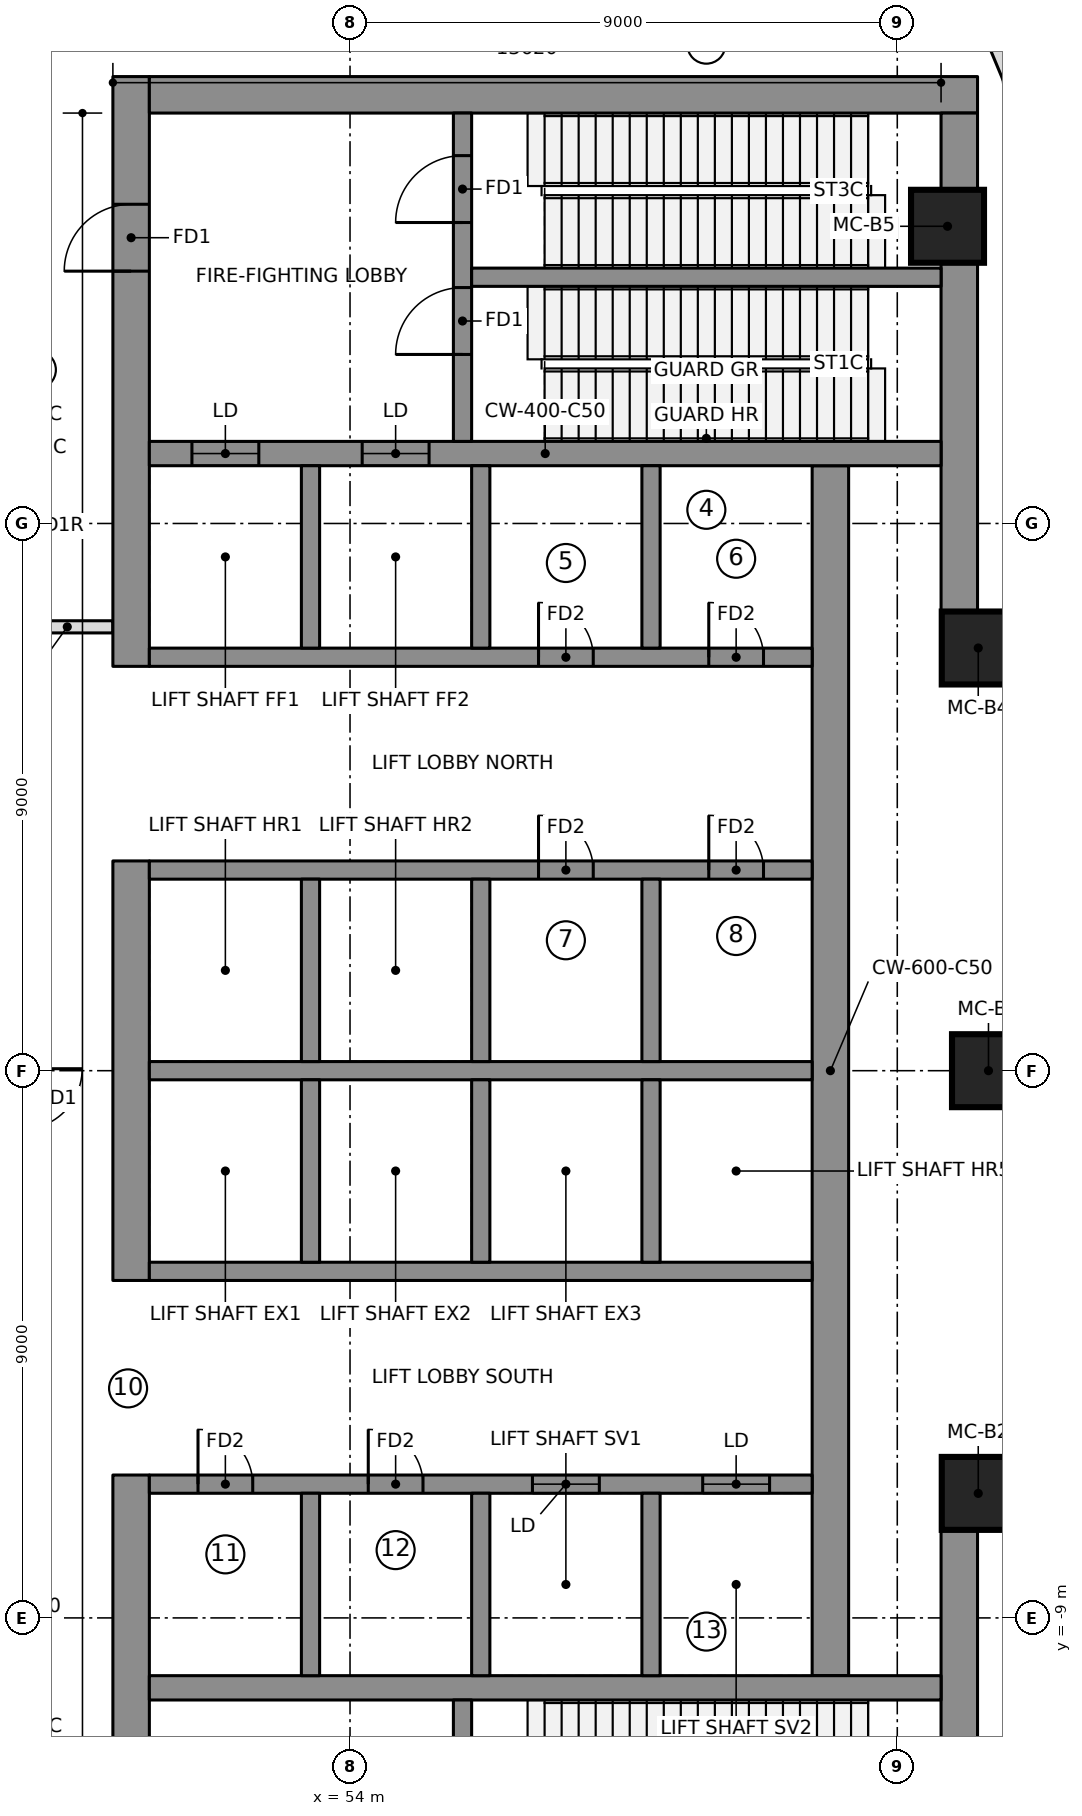
"""IFC4 building model, lengths in metres.
Left out: names, types, materials, properties, quantities, classifications, styles, units other than length and angle.
Written with IfcOpenShell. Run it as: python <this file> out.ifc"""

import sys

from ifc_helpers import new_model, si_unit, direction, frame, frame_2d, origin, origin_2d, place, context, subcontext, project, spatial, polyline, rectangle, outline, extrude, element, fill, save


model = new_model("IFC4")
c1 = context("Model", 3, precision=1e-05, world=origin(), true_north=direction((0.0, 1.0)))
c2 = subcontext(c1, "Body", "Model", "MODEL_VIEW")
j1 = project(units=[si_unit("LENGTHUNIT", "METRE"), si_unit("PLANEANGLEUNIT", "RADIAN")], contexts=[c1])
p1 = place(None, origin())
s1 = spatial("IfcSite", under=j1, at=p1, CompositionType="ELEMENT")
p2 = place(p1, origin())
s2 = spatial("IfcBuilding", under=s1, at=p2, CompositionType="ELEMENT")
p3 = place(p2, frame((0.0, 0.0, 256.3)))
s3 = spatial("IfcBuildingStorey", under=s2, at=p3, CompositionType="ELEMENT", Elevation=256.3)
p4 = place(p3, frame((50.4, 6.65, 0.0), z_axis=(0.0, 0.0, 1.0), x_axis=(0.0, 1.0, 0.0)))
e1 = element("IfcWall", 1, at=p4, inside=s3, PredefinedType="SHEAR", context=c2, shape_type="SweptSolid", body=[
    extrude(rectangle(XDim=9.7, YDim=0.6, at=frame_2d((4.85, 0.0))), origin(), (0.0, 0.0, 1.0), 7.0),
])
p5 = place(p4, frame((6.5, 0.0, 0.0)))
e2 = element("IfcOpeningElement", 2, at=p5, cuts=e1, PredefinedType="OPENING", context=c2, shape_type="SweptSolid", body=[
    extrude(rectangle(XDim=1.1, YDim=2.1, at=frame_2d((0.55, 1.05))), frame((0.0, 0.31, 0.0), z_axis=(0.0, -1.0, 0.0), x_axis=(1.0, 0.0, 0.0)), (0.0, 0.0, 1.0), 0.62),
])
p6 = place(p3, frame((50.4, -3.45, 0.0), z_axis=(0.0, 0.0, 1.0), x_axis=(0.0, 1.0, 0.0)))
e3 = element("IfcWall", 3, at=p6, inside=s3, PredefinedType="SHEAR", context=c2, shape_type="SweptSolid", body=[
    extrude(rectangle(XDim=6.9, YDim=0.6, at=frame_2d((3.45, 0.0))), origin(), (0.0, 0.0, 1.0), 7.0),
])
p7 = place(p3, frame((50.4, -16.35, 0.0), z_axis=(0.0, 0.0, 1.0), x_axis=(0.0, 1.0, 0.0)))
e4 = element("IfcWall", 4, at=p7, inside=s3, PredefinedType="SHEAR", context=c2, shape_type="SweptSolid", body=[
    extrude(rectangle(XDim=9.7, YDim=0.6, at=frame_2d((4.85, 0.0))), origin(), (0.0, 0.0, 1.0), 7.0),
])
p8 = place(p7, frame((2.1, 0.0, 0.0)))
e5 = element("IfcOpeningElement", 5, at=p8, cuts=e4, PredefinedType="OPENING", context=c2, shape_type="SweptSolid", body=[
    extrude(rectangle(XDim=1.1, YDim=2.1, at=frame_2d((0.55, 1.05))), frame((0.0, 0.31, 0.0), z_axis=(0.0, -1.0, 0.0), x_axis=(1.0, 0.0, 0.0)), (0.0, 0.0, 1.0), 0.62),
])
p9 = place(p3, frame((50.7, 16.05, 0.0), z_axis=(0.0, 0.0, 1.0), x_axis=(1.0, 0.0, 0.0)))
e6 = element("IfcWall", 6, at=p9, inside=s3, PredefinedType="SHEAR", context=c2, shape_type="SweptSolid", body=[
    extrude(rectangle(XDim=13.62, YDim=0.6, at=frame_2d((6.81, 0.0))), origin(), (0.0, 0.0, 1.0), 7.0),
])
for number, where, z_axis, x_axis in (
    (7, (64.02, 7.502, 0.0), (0.0, 0.0, 1.0), (0.0, 1.0, 0.0)),
    (8, (64.02, -15.75, 0.0), (0.0, 0.0, 1.0), (0.0, 1.0, 0.0)),
):
    element("IfcWall", number, at=place(p3, frame(where, z_axis=z_axis, x_axis=x_axis)), inside=s3, PredefinedType="SHEAR", context=c2, shape_type="SweptSolid", body=[
        extrude(rectangle(XDim=8.248, YDim=0.6, at=frame_2d((4.124, 0.0))), origin(), (0.0, 0.0, 1.0), 7.0),
    ])
p10 = place(p3, frame((61.9, -9.95, 0.0), z_axis=(0.0, 0.0, 1.0), x_axis=(0.0, 1.0, 0.0)))
e9 = element("IfcWall", 9, at=p10, inside=s3, PredefinedType="SHEAR", context=c2, shape_type="SweptSolid", body=[
    extrude(rectangle(XDim=19.9, YDim=0.6, at=frame_2d((9.95, 0.0))), origin(), (0.0, 0.0, 1.0), 7.0),
])
p11 = place(p3, frame((50.7, 10.15, 0.0), z_axis=(0.0, 0.0, 1.0), x_axis=(1.0, 0.0, 0.0)))
e10 = element("IfcWall", 10, at=p11, inside=s3, PredefinedType="SHEAR", context=c2, shape_type="SweptSolid", body=[
    extrude(rectangle(XDim=13.02, YDim=0.4, at=frame_2d((6.51, 0.0))), origin(), (0.0, 0.0, 1.0), 7.0),
])
p12 = place(p11, frame((0.7, 0.0, 0.0)))
e11 = element("IfcOpeningElement", 11, at=p12, cuts=e10, PredefinedType="OPENING", context=c2, shape_type="SweptSolid", body=[
    extrude(rectangle(XDim=1.1, YDim=2.1, at=frame_2d((0.55, 1.05))), frame((0.0, 0.21, 0.0), z_axis=(0.0, -1.0, 0.0), x_axis=(1.0, 0.0, 0.0)), (0.0, 0.0, 1.0), 0.42),
])
p13 = place(p11, frame((3.5, 0.0, 0.0)))
e12 = element("IfcOpeningElement", 12, at=p13, cuts=e10, PredefinedType="OPENING", context=c2, shape_type="SweptSolid", body=[
    extrude(rectangle(XDim=1.1, YDim=2.1, at=frame_2d((0.55, 1.05))), frame((0.0, 0.21, 0.0), z_axis=(0.0, -1.0, 0.0), x_axis=(1.0, 0.0, 0.0)), (0.0, 0.0, 1.0), 0.42),
])
p14 = place(p3, frame((50.7, -10.15, 0.0), z_axis=(0.0, 0.0, 1.0), x_axis=(1.0, 0.0, 0.0)))
e13 = element("IfcWall", 13, at=p14, inside=s3, PredefinedType="SHEAR", context=c2, shape_type="SweptSolid", body=[
    extrude(rectangle(XDim=13.02, YDim=0.4, at=frame_2d((6.51, 0.0))), origin(), (0.0, 0.0, 1.0), 7.0),
])
p15 = place(p3, frame((50.7, 0.0, 0.0), z_axis=(0.0, 0.0, 1.0), x_axis=(1.0, 0.0, 0.0)))
e14 = element("IfcWall", 14, at=p15, inside=s3, PredefinedType="SHEAR", context=c2, shape_type="SweptSolid", body=[
    extrude(rectangle(XDim=10.9, YDim=0.3, at=frame_2d((5.45, 0.0))), origin(), (0.0, 0.0, 1.0), 7.0),
])
p16 = place(p3, frame((50.7, 3.3, 0.0), z_axis=(0.0, 0.0, 1.0), x_axis=(1.0, 0.0, 0.0)))
e15 = element("IfcWall", 15, at=p16, inside=s3, PredefinedType="SHEAR", context=c2, shape_type="SweptSolid", body=[
    extrude(rectangle(XDim=10.9, YDim=0.3, at=frame_2d((5.45, 0.0))), origin(), (0.0, 0.0, 1.0), 7.0),
])
p17 = place(p16, frame((6.4, 0.0, 0.0)))
e16 = element("IfcOpeningElement", 16, at=p17, cuts=e15, PredefinedType="OPENING", context=c2, shape_type="SweptSolid", body=[
    extrude(rectangle(XDim=0.9, YDim=2.1, at=frame_2d((0.45, 1.05))), frame((0.0, 0.16, 0.0), z_axis=(0.0, -1.0, 0.0), x_axis=(1.0, 0.0, 0.0)), (0.0, 0.0, 1.0), 0.32),
])
p18 = place(p16, frame((9.2, 0.0, 0.0)))
e17 = element("IfcOpeningElement", 17, at=p18, cuts=e15, PredefinedType="OPENING", context=c2, shape_type="SweptSolid", body=[
    extrude(rectangle(XDim=0.9, YDim=2.1, at=frame_2d((0.45, 1.05))), frame((0.0, 0.16, 0.0), z_axis=(0.0, -1.0, 0.0), x_axis=(1.0, 0.0, 0.0)), (0.0, 0.0, 1.0), 0.32),
])
p19 = place(p3, frame((50.7, 6.8, 0.0), z_axis=(0.0, 0.0, 1.0), x_axis=(1.0, 0.0, 0.0)))
e18 = element("IfcWall", 18, at=p19, inside=s3, PredefinedType="SHEAR", context=c2, shape_type="SweptSolid", body=[
    extrude(rectangle(XDim=10.9, YDim=0.3, at=frame_2d((5.45, 0.0))), origin(), (0.0, 0.0, 1.0), 7.0),
])
p20 = place(p19, frame((6.4, 0.0, 0.0)))
e19 = element("IfcOpeningElement", 19, at=p20, cuts=e18, PredefinedType="OPENING", context=c2, shape_type="SweptSolid", body=[
    extrude(rectangle(XDim=0.9, YDim=2.1, at=frame_2d((0.45, 1.05))), frame((0.0, 0.16, 0.0), z_axis=(0.0, -1.0, 0.0), x_axis=(1.0, 0.0, 0.0)), (0.0, 0.0, 1.0), 0.32),
])
p21 = place(p19, frame((9.2, 0.0, 0.0)))
e20 = element("IfcOpeningElement", 20, at=p21, cuts=e18, PredefinedType="OPENING", context=c2, shape_type="SweptSolid", body=[
    extrude(rectangle(XDim=0.9, YDim=2.1, at=frame_2d((0.45, 1.05))), frame((0.0, 0.16, 0.0), z_axis=(0.0, -1.0, 0.0), x_axis=(1.0, 0.0, 0.0)), (0.0, 0.0, 1.0), 0.32),
])
for number, where, z_axis, x_axis in (
    (21, (53.35, 0.15, 0.0), (0.0, 0.0, 1.0), (0.0, 1.0, 0.0)),
    (22, (53.35, 6.95, 0.0), (0.0, 0.0, 1.0), (0.0, 1.0, 0.0)),
    (23, (56.15, 0.15, 0.0), (0.0, 0.0, 1.0), (0.0, 1.0, 0.0)),
    (24, (56.15, 6.95, 0.0), (0.0, 0.0, 1.0), (0.0, 1.0, 0.0)),
    (25, (58.95, 0.15, 0.0), (0.0, 0.0, 1.0), (0.0, 1.0, 0.0)),
    (26, (58.95, 6.95, 0.0), (0.0, 0.0, 1.0), (0.0, 1.0, 0.0)),
):
    element("IfcWall", number, at=place(p3, frame(where, z_axis=z_axis, x_axis=x_axis)), inside=s3, PredefinedType="SHEAR", context=c2, shape_type="SweptSolid", body=[
        extrude(rectangle(XDim=3.0, YDim=0.3, at=frame_2d((1.5, 0.0))), origin(), (0.0, 0.0, 1.0), 7.0),
    ])
p22 = place(p3, frame((50.7, -3.3, 0.0), z_axis=(0.0, 0.0, 1.0), x_axis=(1.0, 0.0, 0.0)))
e27 = element("IfcWall", 27, at=p22, inside=s3, PredefinedType="SHEAR", context=c2, shape_type="SweptSolid", body=[
    extrude(rectangle(XDim=10.9, YDim=0.3, at=frame_2d((5.45, 0.0))), origin(), (0.0, 0.0, 1.0), 7.0),
])
p23 = place(p3, frame((50.7, -6.8, 0.0), z_axis=(0.0, 0.0, 1.0), x_axis=(1.0, 0.0, 0.0)))
e28 = element("IfcWall", 28, at=p23, inside=s3, PredefinedType="SHEAR", context=c2, shape_type="SweptSolid", body=[
    extrude(rectangle(XDim=10.9, YDim=0.3, at=frame_2d((5.45, 0.0))), origin(), (0.0, 0.0, 1.0), 7.0),
])
p24 = place(p23, frame((6.3, 0.0, 0.0)))
e29 = element("IfcOpeningElement", 29, at=p24, cuts=e28, PredefinedType="OPENING", context=c2, shape_type="SweptSolid", body=[
    extrude(rectangle(XDim=1.1, YDim=2.1, at=frame_2d((0.55, 1.05))), frame((0.0, 0.16, 0.0), z_axis=(0.0, -1.0, 0.0), x_axis=(1.0, 0.0, 0.0)), (0.0, 0.0, 1.0), 0.32),
])
p25 = place(p23, frame((9.1, 0.0, 0.0)))
e30 = element("IfcOpeningElement", 30, at=p25, cuts=e28, PredefinedType="OPENING", context=c2, shape_type="SweptSolid", body=[
    extrude(rectangle(XDim=1.1, YDim=2.1, at=frame_2d((0.55, 1.05))), frame((0.0, 0.16, 0.0), z_axis=(0.0, -1.0, 0.0), x_axis=(1.0, 0.0, 0.0)), (0.0, 0.0, 1.0), 0.32),
])
p26 = place(p23, frame((0.8, 0.0, 0.0)))
e31 = element("IfcOpeningElement", 31, at=p26, cuts=e28, PredefinedType="OPENING", context=c2, shape_type="SweptSolid", body=[
    extrude(rectangle(XDim=0.9, YDim=2.1, at=frame_2d((0.45, 1.05))), frame((0.0, 0.16, 0.0), z_axis=(0.0, -1.0, 0.0), x_axis=(1.0, 0.0, 0.0)), (0.0, 0.0, 1.0), 0.32),
])
p27 = place(p23, frame((3.6, 0.0, 0.0)))
e32 = element("IfcOpeningElement", 32, at=p27, cuts=e28, PredefinedType="OPENING", context=c2, shape_type="SweptSolid", body=[
    extrude(rectangle(XDim=0.9, YDim=2.1, at=frame_2d((0.45, 1.05))), frame((0.0, 0.16, 0.0), z_axis=(0.0, -1.0, 0.0), x_axis=(1.0, 0.0, 0.0)), (0.0, 0.0, 1.0), 0.32),
])
for number, where, z_axis, x_axis in (
    (33, (53.35, -3.15, 0.0), (0.0, 0.0, 1.0), (0.0, 1.0, 0.0)),
    (34, (53.35, -9.95, 0.0), (0.0, 0.0, 1.0), (0.0, 1.0, 0.0)),
    (35, (56.15, -3.15, 0.0), (0.0, 0.0, 1.0), (0.0, 1.0, 0.0)),
    (36, (56.15, -9.95, 0.0), (0.0, 0.0, 1.0), (0.0, 1.0, 0.0)),
    (37, (58.95, -3.15, 0.0), (0.0, 0.0, 1.0), (0.0, 1.0, 0.0)),
    (38, (58.95, -9.95, 0.0), (0.0, 0.0, 1.0), (0.0, 1.0, 0.0)),
):
    element("IfcWall", number, at=place(p3, frame(where, z_axis=z_axis, x_axis=x_axis)), inside=s3, PredefinedType="SHEAR", context=c2, shape_type="SweptSolid", body=[
        extrude(rectangle(XDim=3.0, YDim=0.3, at=frame_2d((1.5, 0.0))), origin(), (0.0, 0.0, 1.0), 7.0),
    ])
p28 = place(p3, frame((55.85, 10.35, 0.0), z_axis=(0.0, 0.0, 1.0), x_axis=(0.0, 1.0, 0.0)))
e39 = element("IfcWall", 39, at=p28, inside=s3, PredefinedType="SHEAR", context=c2, shape_type="SweptSolid", body=[
    extrude(rectangle(XDim=5.4, YDim=0.3, at=frame_2d((2.7, 0.0))), origin(), (0.0, 0.0, 1.0), 7.0),
])
p29 = place(p28, frame((1.43, 0.0, 0.0)))
e40 = element("IfcOpeningElement", 40, at=p29, cuts=e39, PredefinedType="OPENING", context=c2, shape_type="SweptSolid", body=[
    extrude(rectangle(XDim=1.1, YDim=2.1, at=frame_2d((0.55, 1.05))), frame((0.0, 0.16, 0.0), z_axis=(0.0, -1.0, 0.0), x_axis=(1.0, 0.0, 0.0)), (0.0, 0.0, 1.0), 0.32),
])
p30 = place(p28, frame((3.6, 0.0, 0.0)))
e41 = element("IfcOpeningElement", 41, at=p30, cuts=e39, PredefinedType="OPENING", context=c2, shape_type="SweptSolid", body=[
    extrude(rectangle(XDim=1.1, YDim=2.1, at=frame_2d((0.55, 1.05))), frame((0.0, 0.16, 0.0), z_axis=(0.0, -1.0, 0.0), x_axis=(1.0, 0.0, 0.0)), (0.0, 0.0, 1.0), 0.32),
])
p31 = place(p3, frame((55.85, -15.75, 0.0), z_axis=(0.0, 0.0, 1.0), x_axis=(0.0, 1.0, 0.0)))
e42 = element("IfcWall", 42, at=p31, inside=s3, PredefinedType="SHEAR", context=c2, shape_type="SweptSolid", body=[
    extrude(rectangle(XDim=5.4, YDim=0.3, at=frame_2d((2.7, 0.0))), origin(), (0.0, 0.0, 1.0), 7.0),
])
p32 = place(p31, frame((3.6, 0.0, 0.0)))
e43 = element("IfcOpeningElement", 43, at=p32, cuts=e42, PredefinedType="OPENING", context=c2, shape_type="SweptSolid", body=[
    extrude(rectangle(XDim=1.1, YDim=2.1, at=frame_2d((0.55, 1.05))), frame((0.0, 0.16, 0.0), z_axis=(0.0, -1.0, 0.0), x_axis=(1.0, 0.0, 0.0)), (0.0, 0.0, 1.0), 0.32),
])
p33 = place(p31, frame((0.8, 0.0, 0.0)))
e44 = element("IfcOpeningElement", 44, at=p33, cuts=e42, PredefinedType="OPENING", context=c2, shape_type="SweptSolid", body=[
    extrude(rectangle(XDim=0.9, YDim=2.1, at=frame_2d((0.45, 1.05))), frame((0.0, 0.16, 0.0), z_axis=(0.0, -1.0, 0.0), x_axis=(1.0, 0.0, 0.0)), (0.0, 0.0, 1.0), 0.32),
])
p34 = place(p3, frame((56.0, 13.05, 0.0), z_axis=(0.0, 0.0, 1.0), x_axis=(1.0, 0.0, 0.0)))
e45 = element("IfcWall", 45, at=p34, inside=s3, PredefinedType="SHEAR", context=c2, shape_type="SweptSolid", body=[
    extrude(rectangle(XDim=7.72, YDim=0.3, at=frame_2d((3.86, 0.0))), origin(), (0.0, 0.0, 1.0), 7.0),
])
for number, where, z_axis, x_axis in (
    (46, (64.332, -6.952, 0.0), (0.0, 0.0, 1.0), (1.0, 0.0, 0.0)),
    (47, (64.5, 0.0, 0.0), (0.0, 0.0, 1.0), (1.0, 0.0, 0.0)),
    (48, (64.332, 6.952, 0.0), (0.0, 0.0, 1.0), (1.0, 0.0, 0.0)),
    (49, (63.826, 13.888, 0.0), (0.0, 0.0, 1.0), (1.0, 0.0, 0.0)),
):
    element("IfcColumn", number, at=place(p3, frame(where, z_axis=z_axis, x_axis=x_axis)), inside=s3, PredefinedType="COLUMN", context=c2, shape_type="SweptSolid", body=[
        extrude(rectangle(XDim=1.2, YDim=1.2, at=origin_2d()), origin(), (0.0, 0.0, 1.0), 5.2),
    ])
p35 = place(p3, frame((64.938, 16.337, 0.0), z_axis=(0.0, 0.0, 1.0), x_axis=(-0.3844335483, 0.923152667191, 0.0)))
e50 = element("IfcWall", 50, at=p35, inside=s3, PredefinedType="NOTDEFINED", context=c2, shape_type="SweptSolid", body=[
    extrude(outline(polyline([(-0.03, -0.2), (3.871, -0.2), (3.756, 0.2), (0.03, 0.2), (-0.03, -0.2)])), origin(), (0.0, 0.0, 1.0), 6.7),
])
p36 = place(p3, frame((48.6, 7.3, 0.0), z_axis=(0.0, 0.0, 1.0), x_axis=(1.0, 0.0, 0.0)))
e51 = element("IfcWall", 51, at=p36, inside=s3, PredefinedType="PARTITIONING", context=c2, shape_type="SweptSolid", body=[
    extrude(rectangle(XDim=1.5, YDim=0.2, at=frame_2d((0.75, 0.0))), origin(), (0.0, 0.0, 1.0), 6.7),
])
p37 = place(p12, origin())
e52 = element("IfcDoor", 52, at=p37, inside=s3, OperationType="DOUBLE_DOOR_SLIDING", PredefinedType="DOOR", context=c2, shape_type="SweptSolid", body=[
    extrude(rectangle(XDim=1.1, YDim=2.1, at=frame_2d((0.55, 1.05))), frame((0.0, 0.025, 0.0), z_axis=(0.0, -1.0, 0.0), x_axis=(1.0, 0.0, 0.0)), (0.0, 0.0, 1.0), 0.05),
])
fill(e11, e52)
p38 = place(p13, origin())
e53 = element("IfcDoor", 53, at=p38, inside=s3, OperationType="DOUBLE_DOOR_SLIDING", PredefinedType="DOOR", context=c2, shape_type="SweptSolid", body=[
    extrude(rectangle(XDim=1.1, YDim=2.1, at=frame_2d((0.55, 1.05))), frame((0.0, 0.025, 0.0), z_axis=(0.0, -1.0, 0.0), x_axis=(1.0, 0.0, 0.0)), (0.0, 0.0, 1.0), 0.05),
])
fill(e12, e53)
p39 = place(p24, origin())
e54 = element("IfcDoor", 54, at=p39, inside=s3, OperationType="DOUBLE_DOOR_SLIDING", PredefinedType="DOOR", context=c2, shape_type="SweptSolid", body=[
    extrude(rectangle(XDim=1.1, YDim=2.1, at=frame_2d((0.55, 1.05))), frame((0.0, 0.025, 0.0), z_axis=(0.0, -1.0, 0.0), x_axis=(1.0, 0.0, 0.0)), (0.0, 0.0, 1.0), 0.05),
])
fill(e29, e54)
p40 = place(p25, origin())
e55 = element("IfcDoor", 55, at=p40, inside=s3, OperationType="DOUBLE_DOOR_SLIDING", PredefinedType="DOOR", context=c2, shape_type="SweptSolid", body=[
    extrude(rectangle(XDim=1.1, YDim=2.1, at=frame_2d((0.55, 1.05))), frame((0.0, 0.025, 0.0), z_axis=(0.0, -1.0, 0.0), x_axis=(1.0, 0.0, 0.0)), (0.0, 0.0, 1.0), 0.05),
])
fill(e30, e55)
p41 = place(p29, origin())
e56 = element("IfcDoor", 56, at=p41, inside=s3, OperationType="SINGLE_SWING_RIGHT", PredefinedType="DOOR", context=c2, shape_type="SweptSolid", body=[
    extrude(rectangle(XDim=1.1, YDim=2.1, at=frame_2d((0.55, 1.05))), frame((0.0, 0.025, 0.0), z_axis=(0.0, -1.0, 0.0), x_axis=(1.0, 0.0, 0.0)), (0.0, 0.0, 1.0), 0.05),
])
fill(e40, e56)
p42 = place(p30, origin())
e57 = element("IfcDoor", 57, at=p42, inside=s3, OperationType="SINGLE_SWING_RIGHT", PredefinedType="DOOR", context=c2, shape_type="SweptSolid", body=[
    extrude(rectangle(XDim=1.1, YDim=2.1, at=frame_2d((0.55, 1.05))), frame((0.0, 0.025, 0.0), z_axis=(0.0, -1.0, 0.0), x_axis=(1.0, 0.0, 0.0)), (0.0, 0.0, 1.0), 0.05),
])
fill(e41, e57)
p43 = place(p5, origin())
e58 = element("IfcDoor", 58, at=p43, inside=s3, OperationType="SINGLE_SWING_RIGHT", PredefinedType="DOOR", context=c2, shape_type="SweptSolid", body=[
    extrude(rectangle(XDim=1.1, YDim=2.1, at=frame_2d((0.55, 1.05))), frame((0.0, 0.025, 0.0), z_axis=(0.0, -1.0, 0.0), x_axis=(1.0, 0.0, 0.0)), (0.0, 0.0, 1.0), 0.05),
])
fill(e2, e58)
p44 = place(p20, origin())
e59 = element("IfcDoor", 59, at=p44, inside=s3, OperationType="SINGLE_SWING_LEFT", PredefinedType="DOOR", context=c2, shape_type="SweptSolid", body=[
    extrude(rectangle(XDim=0.9, YDim=2.1, at=frame_2d((0.45, 1.05))), frame((0.0, 0.025, 0.0), z_axis=(0.0, -1.0, 0.0), x_axis=(1.0, 0.0, 0.0)), (0.0, 0.0, 1.0), 0.05),
])
fill(e19, e59)
p45 = place(p21, origin())
e60 = element("IfcDoor", 60, at=p45, inside=s3, OperationType="SINGLE_SWING_LEFT", PredefinedType="DOOR", context=c2, shape_type="SweptSolid", body=[
    extrude(rectangle(XDim=0.9, YDim=2.1, at=frame_2d((0.45, 1.05))), frame((0.0, 0.025, 0.0), z_axis=(0.0, -1.0, 0.0), x_axis=(1.0, 0.0, 0.0)), (0.0, 0.0, 1.0), 0.05),
])
fill(e20, e60)
p46 = place(p17, origin())
e61 = element("IfcDoor", 61, at=p46, inside=s3, OperationType="SINGLE_SWING_LEFT", PredefinedType="DOOR", context=c2, shape_type="SweptSolid", body=[
    extrude(rectangle(XDim=0.9, YDim=2.1, at=frame_2d((0.45, 1.05))), frame((0.0, 0.025, 0.0), z_axis=(0.0, -1.0, 0.0), x_axis=(1.0, 0.0, 0.0)), (0.0, 0.0, 1.0), 0.05),
])
fill(e16, e61)
p47 = place(p18, origin())
e62 = element("IfcDoor", 62, at=p47, inside=s3, OperationType="SINGLE_SWING_LEFT", PredefinedType="DOOR", context=c2, shape_type="SweptSolid", body=[
    extrude(rectangle(XDim=0.9, YDim=2.1, at=frame_2d((0.45, 1.05))), frame((0.0, 0.025, 0.0), z_axis=(0.0, -1.0, 0.0), x_axis=(1.0, 0.0, 0.0)), (0.0, 0.0, 1.0), 0.05),
])
fill(e17, e62)
p48 = place(p26, origin())
e63 = element("IfcDoor", 63, at=p48, inside=s3, OperationType="SINGLE_SWING_LEFT", PredefinedType="DOOR", context=c2, shape_type="SweptSolid", body=[
    extrude(rectangle(XDim=0.9, YDim=2.1, at=frame_2d((0.45, 1.05))), frame((0.0, 0.025, 0.0), z_axis=(0.0, -1.0, 0.0), x_axis=(1.0, 0.0, 0.0)), (0.0, 0.0, 1.0), 0.05),
])
fill(e31, e63)
p49 = place(p27, origin())
e64 = element("IfcDoor", 64, at=p49, inside=s3, OperationType="SINGLE_SWING_LEFT", PredefinedType="DOOR", context=c2, shape_type="SweptSolid", body=[
    extrude(rectangle(XDim=0.9, YDim=2.1, at=frame_2d((0.45, 1.05))), frame((0.0, 0.025, 0.0), z_axis=(0.0, -1.0, 0.0), x_axis=(1.0, 0.0, 0.0)), (0.0, 0.0, 1.0), 0.05),
])
fill(e32, e64)
save(model, sys.argv[1])
